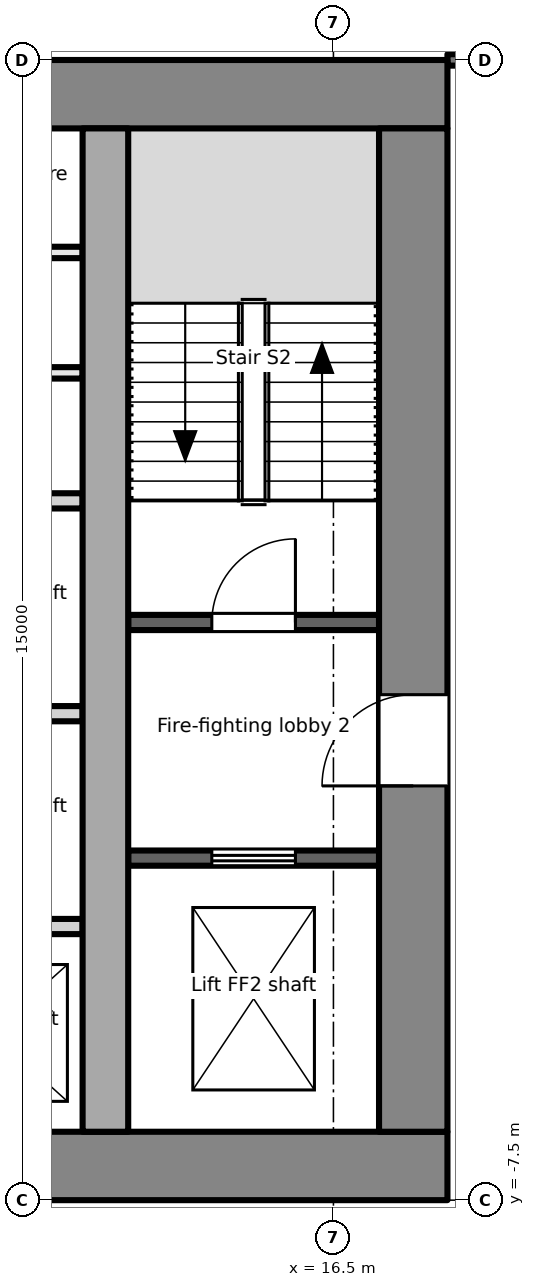
"""IFC4 building model, lengths in metres.
Left out: names, types, materials, properties, quantities, classifications, styles, units other than length and angle.
Written with IfcOpenShell. Run it as: python <this file> out.ifc"""

import sys

from ifc_helpers import new_model, si_unit, direction, frame, frame_2d, origin, place, context, subcontext, project, spatial, rectangle, extrude, element, fill, save


model = new_model("IFC4")
c1 = context("Model", 3, precision=1e-05, world=origin(), true_north=direction((0.0, 1.0)))
c2 = subcontext(c1, "Body", "Model", "MODEL_VIEW")
j1 = project(units=[si_unit("LENGTHUNIT", "METRE"), si_unit("PLANEANGLEUNIT", "RADIAN")], contexts=[c1])
p1 = place(None, origin())
s1 = spatial("IfcSite", under=j1, at=p1, CompositionType="ELEMENT")
p2 = place(p1, origin())
s2 = spatial("IfcBuilding", under=s1, at=p2, CompositionType="ELEMENT")
p3 = place(p2, frame((0.0, 0.0, 150.1)))
s3 = spatial("IfcBuildingStorey", under=s2, at=p3, CompositionType="ELEMENT", Elevation=150.1)
p4 = place(p3, frame((-18.0, -7.05, -0.2), z_axis=(0.0, 0.0, 1.0), x_axis=(1.0, 0.0, 0.0)))
e1 = element("IfcWall", 1, at=p4, inside=s3, PredefinedType="SHEAR", context=c2, shape_type="SweptSolid", body=[
    extrude(rectangle(XDim=36.0, YDim=0.9, at=frame_2d((18.0, 0.0))), origin(), (0.0, 0.0, 1.0), 4.0),
])
p5 = place(p4, frame((7.8, 0.0, 0.2)))
e2 = element("IfcOpeningElement", 2, at=p5, cuts=e1, PredefinedType="OPENING", context=c2, shape_type="SweptSolid", body=[
    extrude(rectangle(XDim=2.4, YDim=2.1, at=frame_2d((1.2, 1.05))), frame((0.0, 0.46, 0.0), z_axis=(0.0, -1.0, 0.0), x_axis=(1.0, 0.0, 0.0)), (0.0, 0.0, 1.0), 0.921),
])
p6 = place(p4, frame((17.4, 0.0, 0.2)))
e3 = element("IfcOpeningElement", 3, at=p6, cuts=e1, PredefinedType="OPENING", context=c2, shape_type="SweptSolid", body=[
    extrude(rectangle(XDim=1.2, YDim=2.1, at=frame_2d((0.6, 1.05))), frame((0.0, 0.46, 0.0), z_axis=(0.0, -1.0, 0.0), x_axis=(1.0, 0.0, 0.0)), (0.0, 0.0, 1.0), 0.921),
])
p7 = place(p4, frame((26.1, 0.0, 0.2)))
e4 = element("IfcOpeningElement", 4, at=p7, cuts=e1, PredefinedType="OPENING", context=c2, shape_type="SweptSolid", body=[
    extrude(rectangle(XDim=2.4, YDim=2.1, at=frame_2d((1.2, 1.05))), frame((0.0, 0.46, 0.0), z_axis=(0.0, -1.0, 0.0), x_axis=(1.0, 0.0, 0.0)), (0.0, 0.0, 1.0), 0.921),
])
p8 = place(p3, frame((-18.0, 7.05, -0.2), z_axis=(0.0, 0.0, 1.0), x_axis=(1.0, 0.0, 0.0)))
e5 = element("IfcWall", 5, at=p8, inside=s3, PredefinedType="SHEAR", context=c2, shape_type="SweptSolid", body=[
    extrude(rectangle(XDim=36.0, YDim=0.9, at=frame_2d((18.0, 0.0))), origin(), (0.0, 0.0, 1.0), 4.0),
])
p9 = place(p3, frame((17.55, -6.6, -0.2), z_axis=(0.0, 0.0, 1.0), x_axis=(0.0, 1.0, 0.0)))
e6 = element("IfcWall", 6, at=p9, inside=s3, PredefinedType="SHEAR", context=c2, shape_type="SweptSolid", body=[
    extrude(rectangle(XDim=13.2, YDim=0.9, at=frame_2d((6.6, 0.0))), origin(), (0.0, 0.0, 1.0), 4.0),
])
p10 = place(p9, frame((4.55, 0.0, 0.2)))
e7 = element("IfcOpeningElement", 7, at=p10, cuts=e6, PredefinedType="OPENING", context=c2, shape_type="SweptSolid", body=[
    extrude(rectangle(XDim=1.2, YDim=2.1, at=frame_2d((0.6, 1.05))), frame((0.0, 0.46, 0.0), z_axis=(0.0, -1.0, 0.0), x_axis=(1.0, 0.0, 0.0)), (0.0, 0.0, 1.0), 0.921),
])
p11 = place(p3, frame((13.5, -6.6, -0.2), z_axis=(0.0, 0.0, 1.0), x_axis=(0.0, 1.0, 0.0)))
e8 = element("IfcWall", 8, at=p11, inside=s3, PredefinedType="SHEAR", context=c2, shape_type="SweptSolid", body=[
    extrude(rectangle(XDim=13.2, YDim=0.6, at=frame_2d((6.6, 0.0))), origin(), (0.0, 0.0, 1.0), 4.0),
])
p12 = place(p3, frame((13.8, -3.0, 0.0), z_axis=(0.0, 0.0, 1.0), x_axis=(1.0, 0.0, 0.0)))
e9 = element("IfcWall", 9, at=p12, inside=s3, PredefinedType="PARTITIONING", context=c2, shape_type="SweptSolid", body=[
    extrude(rectangle(XDim=3.3, YDim=0.2, at=frame_2d((1.65, 0.0))), origin(), (0.0, 0.0, 1.0), 3.8),
])
p13 = place(p12, frame((1.1, 0.0, 0.0)))
e10 = element("IfcOpeningElement", 10, at=p13, cuts=e9, PredefinedType="OPENING", context=c2, shape_type="SweptSolid", body=[
    extrude(rectangle(XDim=1.1, YDim=2.1, at=frame_2d((0.55, 1.05))), frame((0.0, 0.111, 0.0), z_axis=(0.0, -1.0, 0.0), x_axis=(1.0, 0.0, 0.0)), (0.0, 0.0, 1.0), 0.221),
])
p14 = place(p3, frame((13.8, 0.1, 0.0), z_axis=(0.0, 0.0, 1.0), x_axis=(1.0, 0.0, 0.0)))
e11 = element("IfcWall", 11, at=p14, inside=s3, PredefinedType="PARTITIONING", context=c2, shape_type="SweptSolid", body=[
    extrude(rectangle(XDim=3.3, YDim=0.2, at=frame_2d((1.65, 0.0))), origin(), (0.0, 0.0, 1.0), 3.8),
])
p15 = place(p14, frame((1.1, 0.0, 0.0)))
e12 = element("IfcOpeningElement", 12, at=p15, cuts=e11, PredefinedType="OPENING", context=c2, shape_type="SweptSolid", body=[
    extrude(rectangle(XDim=1.1, YDim=2.1, at=frame_2d((0.55, 1.05))), frame((0.0, 0.111, 0.0), z_axis=(0.0, -1.0, 0.0), x_axis=(1.0, 0.0, 0.0)), (0.0, 0.0, 1.0), 0.221),
])
for number, where, z_axis, x_axis in (
    (13, (10.9, -3.9, 0.0), (0.0, 0.0, 1.0), (1.0, 0.0, 0.0)),
    (14, (10.9, -1.1, 0.0), (0.0, 0.0, 1.0), (1.0, 0.0, 0.0)),
    (15, (10.9, 1.7, 0.0), (0.0, 0.0, 1.0), (1.0, 0.0, 0.0)),
):
    element("IfcWall", number, at=place(p3, frame(where, z_axis=z_axis, x_axis=x_axis)), inside=s3, PredefinedType="PARTITIONING", context=c2, shape_type="SweptSolid", body=[
        extrude(rectangle(XDim=2.3, YDim=0.2, at=frame_2d((1.15, 0.0))), origin(), (0.0, 0.0, 1.0), 3.8),
    ])
for number, where, z_axis, x_axis in (
    (16, (10.9, 3.384, 0.0), (0.0, 0.0, 1.0), (1.0, 0.0, 0.0)),
    (17, (10.9, 4.968, 0.0), (0.0, 0.0, 1.0), (1.0, 0.0, 0.0)),
):
    element("IfcWall", number, at=place(p3, frame(where, z_axis=z_axis, x_axis=x_axis)), inside=s3, PredefinedType="PARTITIONING", context=c2, shape_type="SweptSolid", body=[
        extrude(rectangle(XDim=2.3, YDim=0.15, at=frame_2d((1.15, 0.0))), origin(), (0.0, 0.0, 1.0), 3.8),
    ])
p16 = place(p3, frame((18.0, 7.501, 0.0), z_axis=(0.0, 0.0, 1.0), x_axis=(1.0, 0.0, 0.0)))
e18 = element("IfcWall", 18, at=p16, inside=s3, PredefinedType="PARTITIONING", context=c2, shape_type="SweptSolid", body=[
    extrude(rectangle(XDim=2.325, YDim=0.15, at=frame_2d((1.163, 0.0))), origin(), (0.0, 0.0, 1.0), 3.8),
])
p17 = place(p13, origin())
e19 = element("IfcDoor", 19, at=p17, inside=s3, OperationType="DOUBLE_DOOR_SLIDING", PredefinedType="DOOR", context=c2, shape_type="SweptSolid", body=[
    extrude(rectangle(XDim=1.1, YDim=2.1, at=frame_2d((0.55, 1.05))), frame((0.0, 0.025, 0.0), z_axis=(0.0, -1.0, 0.0), x_axis=(1.0, 0.0, 0.0)), (0.0, 0.0, 1.0), 0.05),
])
fill(e10, e19)
p18 = place(p10, origin())
e20 = element("IfcDoor", 20, at=p18, inside=s3, OperationType="SINGLE_SWING_LEFT", PredefinedType="DOOR", context=c2, shape_type="SweptSolid", body=[
    extrude(rectangle(XDim=1.2, YDim=2.1, at=frame_2d((0.6, 1.05))), frame((0.0, 0.025, 0.0), z_axis=(0.0, -1.0, 0.0), x_axis=(1.0, 0.0, 0.0)), (0.0, 0.0, 1.0), 0.05),
])
fill(e7, e20)
p19 = place(p15, origin())
e21 = element("IfcDoor", 21, at=p19, inside=s3, OperationType="SINGLE_SWING_RIGHT", PredefinedType="DOOR", context=c2, shape_type="SweptSolid", body=[
    extrude(rectangle(XDim=1.1, YDim=2.1, at=frame_2d((0.55, 1.05))), frame((0.0, 0.025, 0.0), z_axis=(0.0, -1.0, 0.0), x_axis=(1.0, 0.0, 0.0)), (0.0, 0.0, 1.0), 0.05),
])
fill(e12, e21)
save(model, sys.argv[1])
